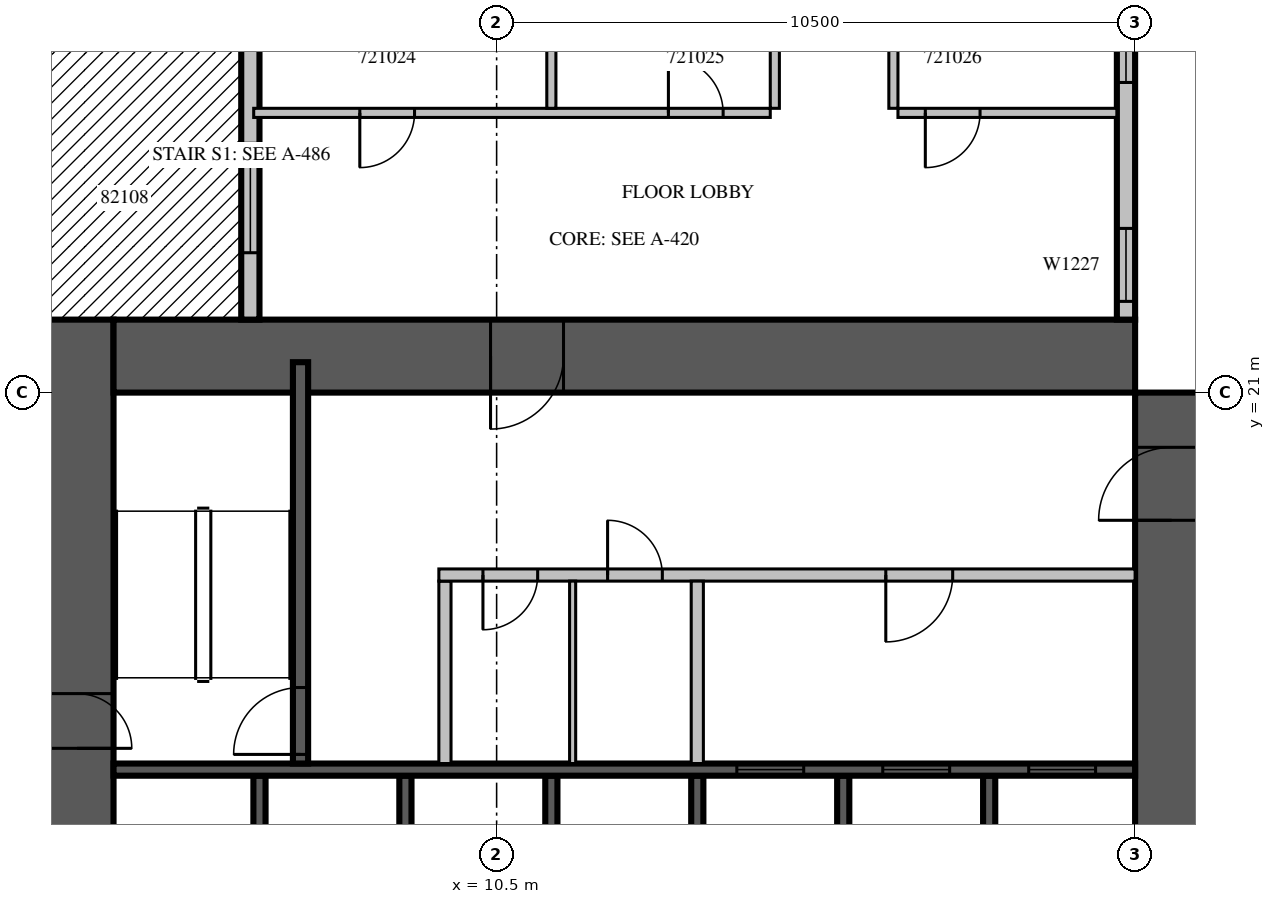
"""IFC4 building model, lengths in metres.
Left out: names, types, materials, properties, quantities, classifications, styles, units other than length and angle.
Written with IfcOpenShell. Run it as: python <this file> out.ifc"""

import sys

from ifc_helpers import new_model, si_unit, direction, frame, frame_2d, origin, place, context, subcontext, project, spatial, rectangle, extrude, source, transform, mapped, element, fill, save


model = new_model("IFC4")
c1 = context("Model", 3, precision=1e-05, world=origin(), true_north=direction((0.0, 1.0)))
c2 = subcontext(c1, "Body", "Model", "MODEL_VIEW")
j1 = project(units=[si_unit("LENGTHUNIT", "METRE"), si_unit("PLANEANGLEUNIT", "RADIAN")], contexts=[c1])
p1 = place(None, origin())
s1 = spatial("IfcSite", under=j1, at=p1, CompositionType="ELEMENT")
p2 = place(p1, origin())
s2 = spatial("IfcBuilding", under=s1, at=p2, CompositionType="ELEMENT")
p3 = place(p2, frame((0.0, 0.0, 99.3)))
s3 = spatial("IfcBuildingStorey", under=s2, at=p3, CompositionType="ELEMENT", Elevation=99.3)
m1 = source(origin(), c2, "Body", "SweptSolid", [
    extrude(rectangle(XDim=18.0, YDim=1.2, at=frame_2d((9.0, 0.0))), origin(), (0.0, 0.0, 1.0), 4.2),
])
p4 = place(p3, frame((3.6, 4.2, 0.0), z_axis=(0.0, 0.0, 1.0), x_axis=(0.0, 1.0, 0.0)))
e1 = element("IfcWall", 1, at=p4, inside=s3, PredefinedType="SHEAR", context=c2, shape_type="MappedRepresentation", body=[
    mapped(m1, transform((0.0, 0.0, 0.0), scale=1.0)),
])
m2 = source(origin(), c2, "Body", "SweptSolid", [
    extrude(rectangle(XDim=2.2, YDim=2.1, at=frame_2d((1.1, 1.05))), frame((0.0, 0.61, 0.0), z_axis=(0.0, -1.0, 0.0), x_axis=(1.0, 0.0, 0.0)), (0.0, 0.0, 1.0), 1.22),
])
p5 = place(p4, frame((4.2, 0.0, 0.0)))
e2 = element("IfcOpeningElement", 2, at=p5, cuts=e1, PredefinedType="OPENING", context=c2, shape_type="MappedRepresentation", body=[
    mapped(m2, transform((0.0, 0.0, 0.0), scale=1.0)),
])
p6 = place(p4, frame((10.95, 0.0, 0.0)))
e3 = element("IfcOpeningElement", 3, at=p6, cuts=e1, PredefinedType="OPENING", context=c2, shape_type="SweptSolid", body=[
    extrude(rectangle(XDim=0.9, YDim=2.1, at=frame_2d((0.45, 1.05))), frame((0.0, 0.61, 0.0), z_axis=(0.0, -1.0, 0.0), x_axis=(1.0, 0.0, 0.0)), (0.0, 0.0, 1.0), 1.22),
])
m3 = source(origin(), c2, "Body", "SweptSolid", [
    extrude(rectangle(XDim=16.8, YDim=1.2, at=frame_2d((8.4, 0.0))), origin(), (0.0, 0.0, 1.0), 4.2),
])
p7 = place(p3, frame((21.6, 4.2, 0.0), z_axis=(0.0, 0.0, 1.0), x_axis=(0.0, 1.0, 0.0)))
e4 = element("IfcWall", 4, at=p7, inside=s3, PredefinedType="SHEAR", context=c2, shape_type="MappedRepresentation", body=[
    mapped(m3, transform((0.0, 0.0, 0.0), scale=1.0)),
])
m4 = source(origin(), c2, "Body", "SweptSolid", [
    extrude(rectangle(XDim=1.2, YDim=2.1, at=frame_2d((0.6, 1.05))), frame((0.0, 0.61, 0.0), z_axis=(0.0, -1.0, 0.0), x_axis=(1.0, 0.0, 0.0)), (0.0, 0.0, 1.0), 1.22),
])
p8 = place(p7, frame((14.7, 0.0, 0.0)))
e5 = element("IfcOpeningElement", 5, at=p8, cuts=e4, PredefinedType="OPENING", context=c2, shape_type="MappedRepresentation", body=[
    mapped(m4, transform((0.0, 0.0, 0.0), scale=1.0)),
])
p9 = place(p3, frame((4.2, 21.6, 0.0), z_axis=(0.0, 0.0, 1.0), x_axis=(1.0, 0.0, 0.0)))
e6 = element("IfcWall", 6, at=p9, inside=s3, PredefinedType="SHEAR", context=c2, shape_type="MappedRepresentation", body=[
    mapped(m3, transform((0.0, 0.0, 0.0), scale=1.0)),
])
p10 = place(p9, frame((6.2, 0.0, 0.0)))
e7 = element("IfcOpeningElement", 7, at=p10, cuts=e6, PredefinedType="OPENING", context=c2, shape_type="MappedRepresentation", body=[
    mapped(m4, transform((0.0, 0.0, 0.0), scale=1.0)),
])
m5 = source(origin(), c2, "Body", "SweptSolid", [
    extrude(rectangle(XDim=6.6, YDim=0.3, at=frame_2d((3.3, 0.0))), origin(), (0.0, 0.0, 1.0), 3.8),
])
p11 = place(p3, frame((20.85, 22.2, 0.0), z_axis=(0.0, 0.0, 1.0), x_axis=(0.0, 1.0, 0.0)))
e8 = element("IfcWall", 8, at=p11, inside=s3, PredefinedType="STANDARD", context=c2, shape_type="MappedRepresentation", body=[
    mapped(m5, transform((0.0, 0.0, 0.0), scale=1.0)),
])
m6 = source(origin(), c2, "Body", "SweptSolid", [
    extrude(rectangle(XDim=1.2, YDim=2.7, at=frame_2d((0.6, 1.35))), frame((0.0, 0.16, 0.0), z_axis=(0.0, -1.0, 0.0), x_axis=(1.0, 0.0, 0.0)), (0.0, 0.0, 1.0), 0.32),
])
p12 = place(p11, frame((0.3, 0.0, 0.6)))
e9 = element("IfcOpeningElement", 9, at=p12, cuts=e8, PredefinedType="OPENING", context=c2, shape_type="MappedRepresentation", body=[
    mapped(m6, transform((0.0, 0.0, 0.0), scale=1.0)),
])
m7 = source(origin(), c2, "Body", "SweptSolid", [
    extrude(rectangle(XDim=2.4, YDim=2.7, at=frame_2d((1.2, 1.35))), frame((0.0, 0.16, 0.0), z_axis=(0.0, -1.0, 0.0), x_axis=(1.0, 0.0, 0.0)), (0.0, 0.0, 1.0), 0.32),
])
p13 = place(p11, frame((3.9, 0.0, 0.6)))
e10 = element("IfcOpeningElement", 10, at=p13, cuts=e8, PredefinedType="OPENING", context=c2, shape_type="MappedRepresentation", body=[
    mapped(m7, transform((0.0, 0.0, 0.0), scale=1.0)),
])
p14 = place(p3, frame((6.45, 38.4, 0.0), z_axis=(0.0, 0.0, 1.0), x_axis=(0.0, -1.0, 0.0)))
e11 = element("IfcWall", 11, at=p14, inside=s3, PredefinedType="STANDARD", context=c2, shape_type="SweptSolid", body=[
    extrude(rectangle(XDim=16.2, YDim=0.3, at=frame_2d((8.1, 0.0))), origin(), (0.0, 0.0, 1.0), 3.8),
])
m8 = source(origin(), c2, "Body", "SweptSolid", [
    extrude(rectangle(XDim=1.8, YDim=2.4, at=frame_2d((0.9, 1.2))), frame((0.0, 0.16, 0.0), z_axis=(0.0, -1.0, 0.0), x_axis=(1.0, 0.0, 0.0)), (0.0, 0.0, 1.0), 0.32),
])
p15 = place(p14, frame((1.15, 0.0, 0.0)))
e12 = element("IfcOpeningElement", 12, at=p15, cuts=e11, PredefinedType="OPENING", context=c2, shape_type="MappedRepresentation", body=[
    mapped(m8, transform((0.0, 0.0, 0.0), scale=1.0)),
])
p16 = place(p14, frame((5.05, 0.0, 0.0)))
e13 = element("IfcOpeningElement", 13, at=p16, cuts=e11, PredefinedType="OPENING", context=c2, shape_type="MappedRepresentation", body=[
    mapped(m8, transform((0.0, 0.0, 0.0), scale=1.0)),
])
m9 = source(origin(), c2, "Body", "SweptSolid", [
    extrude(rectangle(XDim=1.8, YDim=2.7, at=frame_2d((0.9, 1.35))), frame((0.0, 0.16, 0.0), z_axis=(0.0, -1.0, 0.0), x_axis=(1.0, 0.0, 0.0)), (0.0, 0.0, 1.0), 0.32),
])
p17 = place(p14, frame((9.438, 0.0, 0.6)))
e14 = element("IfcOpeningElement", 14, at=p17, cuts=e11, PredefinedType="OPENING", context=c2, shape_type="MappedRepresentation", body=[
    mapped(m9, transform((0.0, 0.0, 0.0), scale=1.0)),
])
p18 = place(p14, frame((13.3, 0.0, 0.0)))
e15 = element("IfcOpeningElement", 15, at=p18, cuts=e11, PredefinedType="OPENING", context=c2, shape_type="MappedRepresentation", body=[
    mapped(m8, transform((0.0, 0.0, 0.0), scale=1.0)),
])
m10 = source(origin(), c2, "Body", "SweptSolid", [
    extrude(rectangle(XDim=3.0, YDim=0.2, at=frame_2d((1.5, 0.0))), origin(), (0.0, 0.0, 1.0), 4.2),
])
for number, where, z_axis, x_axis in (
    (16, (6.6, 11.7, 0.0), (0.0, 0.0, 1.0), (0.0, 1.0, 0.0)),
    (17, (9.0, 11.7, 0.0), (0.0, 0.0, 1.0), (0.0, 1.0, 0.0)),
    (18, (11.4, 11.7, 0.0), (0.0, 0.0, 1.0), (0.0, 1.0, 0.0)),
    (19, (13.8, 11.7, 0.0), (0.0, 0.0, 1.0), (0.0, 1.0, 0.0)),
    (20, (16.2, 11.7, 0.0), (0.0, 0.0, 1.0), (0.0, 1.0, 0.0)),
    (21, (18.6, 11.7, 0.0), (0.0, 0.0, 1.0), (0.0, 1.0, 0.0)),
):
    element("IfcWall", number, at=place(p3, frame(where, z_axis=z_axis, x_axis=x_axis)), inside=s3, PredefinedType="SOLIDWALL", context=c2, shape_type="MappedRepresentation", body=[
        mapped(m10, transform((0.0, 0.0, 0.0), scale=1.0)),
    ])
m11 = source(origin(), c2, "Body", "SweptSolid", [
    extrude(rectangle(XDim=16.8, YDim=0.2, at=frame_2d((8.4, 0.0))), origin(), (0.0, 0.0, 1.0), 4.2),
])
p19 = place(p3, frame((4.2, 14.8, 0.0), z_axis=(0.0, 0.0, 1.0), x_axis=(1.0, 0.0, 0.0)))
e22 = element("IfcWall", 22, at=p19, inside=s3, PredefinedType="SOLIDWALL", context=c2, shape_type="MappedRepresentation", body=[
    mapped(m11, transform((0.0, 0.0, 0.0), scale=1.0)),
])
m12 = source(origin(), c2, "Body", "SweptSolid", [
    extrude(rectangle(XDim=1.1, YDim=2.1, at=frame_2d((0.55, 1.05))), frame((0.0, 0.11, 0.0), z_axis=(0.0, -1.0, 0.0), x_axis=(1.0, 0.0, 0.0)), (0.0, 0.0, 1.0), 0.22),
])
p20 = place(p19, frame((10.25, 0.0, 0.0)))
e23 = element("IfcOpeningElement", 23, at=p20, cuts=e22, PredefinedType="OPENING", context=c2, shape_type="MappedRepresentation", body=[
    mapped(m12, transform((0.0, 0.0, 0.0), scale=1.0)),
])
p21 = place(p19, frame((12.65, 0.0, 0.0)))
e24 = element("IfcOpeningElement", 24, at=p21, cuts=e22, PredefinedType="OPENING", context=c2, shape_type="MappedRepresentation", body=[
    mapped(m12, transform((0.0, 0.0, 0.0), scale=1.0)),
])
p22 = place(p19, frame((15.05, 0.0, 0.0)))
e25 = element("IfcOpeningElement", 25, at=p22, cuts=e22, PredefinedType="OPENING", context=c2, shape_type="MappedRepresentation", body=[
    mapped(m12, transform((0.0, 0.0, 0.0), scale=1.0)),
])
m13 = source(origin(), c2, "Body", "SweptSolid", [
    extrude(rectangle(XDim=6.6, YDim=0.25, at=frame_2d((3.3, 0.0))), origin(), (0.0, 0.0, 1.0), 3.8),
])
p23 = place(p3, frame((7.275, 14.9, 0.0), z_axis=(0.0, 0.0, 1.0), x_axis=(0.0, 1.0, 0.0)))
e26 = element("IfcWall", 26, at=p23, inside=s3, PredefinedType="SOLIDWALL", context=c2, shape_type="MappedRepresentation", body=[
    mapped(m13, transform((0.0, 0.0, 0.0), scale=1.0)),
])
m14 = source(origin(), c2, "Body", "SweptSolid", [
    extrude(rectangle(XDim=1.1, YDim=2.1, at=frame_2d((0.55, 1.05))), frame((0.0, 0.135, 0.0), z_axis=(0.0, -1.0, 0.0), x_axis=(1.0, 0.0, 0.0)), (0.0, 0.0, 1.0), 0.27),
])
p24 = place(p23, frame((0.15, 0.0, 0.0)))
e27 = element("IfcOpeningElement", 27, at=p24, cuts=e26, PredefinedType="OPENING", context=c2, shape_type="MappedRepresentation", body=[
    mapped(m14, transform((0.0, 0.0, 0.0), scale=1.0)),
])
m15 = source(origin(), c2, "Body", "SweptSolid", [
    extrude(rectangle(XDim=3.0, YDim=0.2, at=frame_2d((1.5, 0.0))), origin(), (0.0, 0.0, 1.0), 3.8),
])
p25 = place(p3, frame((9.65, 14.9, 0.0), z_axis=(0.0, 0.0, 1.0), x_axis=(0.0, 1.0, 0.0)))
e28 = element("IfcWall", 28, at=p25, inside=s3, PredefinedType="PARTITIONING", context=c2, shape_type="MappedRepresentation", body=[
    mapped(m15, transform((0.0, 0.0, 0.0), scale=1.0)),
])
m16 = source(origin(), c2, "Body", "SweptSolid", [
    extrude(rectangle(XDim=11.45, YDim=0.2, at=frame_2d((5.725, 0.0))), origin(), (0.0, 0.0, 1.0), 3.8),
])
p26 = place(p3, frame((9.55, 18.0, 0.0), z_axis=(0.0, 0.0, 1.0), x_axis=(1.0, 0.0, 0.0)))
e29 = element("IfcWall", 29, at=p26, inside=s3, PredefinedType="PARTITIONING", context=c2, shape_type="MappedRepresentation", body=[
    mapped(m16, transform((0.0, 0.0, 0.0), scale=1.0)),
])
m17 = source(origin(), c2, "Body", "SweptSolid", [
    extrude(rectangle(XDim=0.9, YDim=2.1, at=frame_2d((0.45, 1.05))), frame((0.0, 0.11, 0.0), z_axis=(0.0, -1.0, 0.0), x_axis=(1.0, 0.0, 0.0)), (0.0, 0.0, 1.0), 0.22),
])
p27 = place(p26, frame((0.725, 0.0, 0.0)))
e30 = element("IfcOpeningElement", 30, at=p27, cuts=e29, PredefinedType="OPENING", context=c2, shape_type="MappedRepresentation", body=[
    mapped(m17, transform((0.0, 0.0, 0.0), scale=1.0)),
])
p28 = place(p26, frame((2.775, 0.0, 0.0)))
e31 = element("IfcOpeningElement", 31, at=p28, cuts=e29, PredefinedType="OPENING", context=c2, shape_type="MappedRepresentation", body=[
    mapped(m17, transform((0.0, 0.0, 0.0), scale=1.0)),
])
p29 = place(p26, frame((7.35, 0.0, 0.0)))
e32 = element("IfcOpeningElement", 32, at=p29, cuts=e29, PredefinedType="OPENING", context=c2, shape_type="MappedRepresentation", body=[
    mapped(m12, transform((0.0, 0.0, 0.0), scale=1.0)),
])
p30 = place(p3, frame((13.8, 14.9, 0.0), z_axis=(0.0, 0.0, 1.0), x_axis=(0.0, 1.0, 0.0)))
e33 = element("IfcWall", 33, at=p30, inside=s3, PredefinedType="PARTITIONING", context=c2, shape_type="MappedRepresentation", body=[
    mapped(m15, transform((0.0, 0.0, 0.0), scale=1.0)),
])
m18 = source(origin(), c2, "Body", "SweptSolid", [
    extrude(rectangle(XDim=3.0, YDim=0.1, at=frame_2d((1.5, 0.0))), origin(), (0.0, 0.0, 1.0), 3.8),
])
p31 = place(p3, frame((11.75, 14.9, 0.0), z_axis=(0.0, 0.0, 1.0), x_axis=(0.0, 1.0, 0.0)))
e34 = element("IfcWall", 34, at=p31, inside=s3, PredefinedType="PARTITIONING", context=c2, shape_type="MappedRepresentation", body=[
    mapped(m18, transform((0.0, 0.0, 0.0), scale=1.0)),
])
p32 = place(p3, frame((6.505, 25.6, 0.0), z_axis=(0.0, 0.0, 1.0), x_axis=(1.0, 0.0, 0.0)))
e35 = element("IfcWall", 35, at=p32, inside=s3, PredefinedType="PARTITIONING", context=c2, shape_type="SweptSolid", body=[
    extrude(rectangle(XDim=8.495, YDim=0.15, at=frame_2d((4.247, 0.0))), origin(), (0.0, 0.0, 1.0), 3.8),
])
m19 = source(origin(), c2, "Body", "SweptSolid", [
    extrude(rectangle(XDim=0.9, YDim=2.1, at=frame_2d((0.45, 1.05))), frame((0.0, 0.085, 0.0), z_axis=(0.0, -1.0, 0.0), x_axis=(1.0, 0.0, 0.0)), (0.0, 0.0, 1.0), 0.17),
])
p33 = place(p32, frame((1.745, 0.0, 0.0)))
e36 = element("IfcOpeningElement", 36, at=p33, cuts=e35, PredefinedType="OPENING", context=c2, shape_type="MappedRepresentation", body=[
    mapped(m19, transform((0.0, 0.0, 0.0), scale=1.0)),
])
p34 = place(p32, frame((6.82, 0.0, 0.0)))
e37 = element("IfcOpeningElement", 37, at=p34, cuts=e35, PredefinedType="OPENING", context=c2, shape_type="MappedRepresentation", body=[
    mapped(m19, transform((0.0, 0.0, 0.0), scale=1.0)),
])
m20 = source(origin(), c2, "Body", "SweptSolid", [
    extrude(rectangle(XDim=3.6, YDim=0.15, at=frame_2d((1.8, 0.0))), origin(), (0.0, 0.0, 1.0), 3.8),
])
p35 = place(p3, frame((17.1, 25.6, 0.0), z_axis=(0.0, 0.0, 1.0), x_axis=(1.0, 0.0, 0.0)))
e38 = element("IfcWall", 38, at=p35, inside=s3, PredefinedType="PARTITIONING", context=c2, shape_type="MappedRepresentation", body=[
    mapped(m20, transform((0.0, 0.0, 0.0), scale=1.0)),
])
p36 = place(p35, frame((0.45, 0.0, 0.0)))
e39 = element("IfcOpeningElement", 39, at=p36, cuts=e38, PredefinedType="OPENING", context=c2, shape_type="MappedRepresentation", body=[
    mapped(m19, transform((0.0, 0.0, 0.0), scale=1.0)),
])
m21 = source(origin(), c2, "Body", "SweptSolid", [
    extrude(rectangle(XDim=3.65, YDim=0.15, at=frame_2d((1.825, 0.0))), origin(), (0.0, 0.0, 1.0), 3.8),
])
for number, where, z_axis, x_axis in (
    (40, (11.4, 25.675, 0.0), (0.0, 0.0, 1.0), (0.0, 1.0, 0.0)),
    (41, (15.075, 25.675, 0.0), (0.0, 0.0, 1.0), (0.0, 1.0, 0.0)),
    (42, (17.025, 29.325, 0.0), (0.0, 0.0, 1.0), (0.0, -1.0, 0.0)),
):
    element("IfcWall", number, at=place(p3, frame(where, z_axis=z_axis, x_axis=x_axis)), inside=s3, PredefinedType="PARTITIONING", context=c2, shape_type="MappedRepresentation", body=[
        mapped(m21, transform((0.0, 0.0, 0.0), scale=1.0)),
    ])
m22 = source(origin(), c2, "Body", "SweptSolid", [
    extrude(rectangle(XDim=1.2, YDim=2.7, at=frame_2d((0.6, 1.35))), frame((0.0, 0.03, 0.0), z_axis=(0.0, -1.0, 0.0), x_axis=(1.0, 0.0, 0.0)), (0.0, 0.0, 1.0), 0.06),
])
p37 = place(p12, origin())
e43 = element("IfcWindow", 43, at=p37, inside=s3, PartitioningType="SINGLE_PANEL", PredefinedType="WINDOW", context=c2, shape_type="MappedRepresentation", body=[
    mapped(m22, transform((0.0, 0.0, 0.0), scale=1.0)),
])
fill(e9, e43)
m23 = source(origin(), c2, "Body", "SweptSolid", [
    extrude(rectangle(XDim=2.4, YDim=2.7, at=frame_2d((1.2, 1.35))), frame((0.0, 0.03, 0.0), z_axis=(0.0, -1.0, 0.0), x_axis=(1.0, 0.0, 0.0)), (0.0, 0.0, 1.0), 0.06),
])
p38 = place(p13, origin())
e44 = element("IfcWindow", 44, at=p38, inside=s3, PartitioningType="SINGLE_PANEL", PredefinedType="WINDOW", context=c2, shape_type="MappedRepresentation", body=[
    mapped(m23, transform((0.0, 0.0, 0.0), scale=1.0)),
])
fill(e10, e44)
m24 = source(origin(), c2, "Body", "SweptSolid", [
    extrude(rectangle(XDim=1.8, YDim=2.4, at=frame_2d((0.9, 1.2))), frame((0.0, 0.025, 0.0), z_axis=(0.0, -1.0, 0.0), x_axis=(1.0, 0.0, 0.0)), (0.0, 0.0, 1.0), 0.05),
])
p39 = place(p18, origin())
e45 = element("IfcDoor", 45, at=p39, inside=s3, OperationType="SLIDING_TO_LEFT", PredefinedType="DOOR", context=c2, shape_type="MappedRepresentation", body=[
    mapped(m24, transform((0.0, 0.0, 0.0), scale=1.0)),
])
fill(e15, e45)
m25 = source(origin(), c2, "Body", "SweptSolid", [
    extrude(rectangle(XDim=1.1, YDim=2.1, at=frame_2d((0.55, 1.05))), frame((0.0, 0.025, 0.0), z_axis=(0.0, -1.0, 0.0), x_axis=(1.0, 0.0, 0.0)), (0.0, 0.0, 1.0), 0.05),
])
p40 = place(p20, origin())
e46 = element("IfcDoor", 46, at=p40, inside=s3, OperationType="SLIDING_TO_LEFT", PredefinedType="DOOR", context=c2, shape_type="MappedRepresentation", body=[
    mapped(m25, transform((0.0, 0.0, 0.0), scale=1.0)),
])
fill(e23, e46)
p41 = place(p21, origin())
e47 = element("IfcDoor", 47, at=p41, inside=s3, OperationType="SLIDING_TO_LEFT", PredefinedType="DOOR", context=c2, shape_type="MappedRepresentation", body=[
    mapped(m25, transform((0.0, 0.0, 0.0), scale=1.0)),
])
fill(e24, e47)
p42 = place(p22, origin())
e48 = element("IfcDoor", 48, at=p42, inside=s3, OperationType="SLIDING_TO_LEFT", PredefinedType="DOOR", context=c2, shape_type="MappedRepresentation", body=[
    mapped(m25, transform((0.0, 0.0, 0.0), scale=1.0)),
])
fill(e25, e48)
p43 = place(p24, origin())
e49 = element("IfcDoor", 49, at=p43, inside=s3, OperationType="SINGLE_SWING_LEFT", PredefinedType="DOOR", context=c2, shape_type="MappedRepresentation", body=[
    mapped(m25, transform((0.0, 0.0, 0.0), scale=1.0)),
])
fill(e27, e49)
m26 = source(origin(), c2, "Body", "SweptSolid", [
    extrude(rectangle(XDim=0.9, YDim=2.1, at=frame_2d((0.45, 1.05))), frame((0.0, 0.025, 0.0), z_axis=(0.0, -1.0, 0.0), x_axis=(1.0, 0.0, 0.0)), (0.0, 0.0, 1.0), 0.05),
])
p44 = place(p27, origin())
e50 = element("IfcDoor", 50, at=p44, inside=s3, OperationType="SINGLE_SWING_RIGHT", PredefinedType="DOOR", context=c2, shape_type="MappedRepresentation", body=[
    mapped(m26, transform((0.0, 0.0, 0.0), scale=1.0)),
])
fill(e30, e50)
p45 = place(p28, origin())
e51 = element("IfcDoor", 51, at=p45, inside=s3, OperationType="SINGLE_SWING_LEFT", PredefinedType="DOOR", context=c2, shape_type="MappedRepresentation", body=[
    mapped(m26, transform((0.0, 0.0, 0.0), scale=1.0)),
])
fill(e31, e51)
p46 = place(p29, origin())
e52 = element("IfcDoor", 52, at=p46, inside=s3, OperationType="SINGLE_SWING_RIGHT", PredefinedType="DOOR", context=c2, shape_type="MappedRepresentation", body=[
    mapped(m25, transform((0.0, 0.0, 0.0), scale=1.0)),
])
fill(e32, e52)
m27 = source(origin(), c2, "Body", "SweptSolid", [
    extrude(rectangle(XDim=1.2, YDim=2.1, at=frame_2d((0.6, 1.05))), frame((0.0, 0.025, 0.0), z_axis=(0.0, -1.0, 0.0), x_axis=(1.0, 0.0, 0.0)), (0.0, 0.0, 1.0), 0.05),
])
p47 = place(p10, origin())
e53 = element("IfcDoor", 53, at=p47, inside=s3, OperationType="SINGLE_SWING_RIGHT", PredefinedType="DOOR", context=c2, shape_type="MappedRepresentation", body=[
    mapped(m27, transform((0.0, 0.0, 0.0), scale=1.0)),
])
fill(e7, e53)
p48 = place(p8, origin())
e54 = element("IfcDoor", 54, at=p48, inside=s3, OperationType="SINGLE_SWING_LEFT", PredefinedType="DOOR", context=c2, shape_type="MappedRepresentation", body=[
    mapped(m27, transform((0.0, 0.0, 0.0), scale=1.0)),
])
fill(e5, e54)
p49 = place(p6, origin())
e55 = element("IfcDoor", 55, at=p49, inside=s3, OperationType="SINGLE_SWING_RIGHT", PredefinedType="DOOR", context=c2, shape_type="MappedRepresentation", body=[
    mapped(m26, transform((0.0, 0.0, 0.0), scale=1.0)),
])
fill(e3, e55)
p50 = place(p33, origin())
e56 = element("IfcDoor", 56, at=p50, inside=s3, OperationType="SINGLE_SWING_RIGHT", PredefinedType="DOOR", context=c2, shape_type="MappedRepresentation", body=[
    mapped(m26, transform((0.0, 0.0, 0.0), scale=1.0)),
])
fill(e36, e56)
p51 = place(p34, origin())
e57 = element("IfcDoor", 57, at=p51, inside=s3, OperationType="SINGLE_SWING_LEFT", PredefinedType="DOOR", context=c2, shape_type="MappedRepresentation", body=[
    mapped(m26, transform((0.0, 0.0, 0.0), scale=1.0)),
])
fill(e37, e57)
p52 = place(p36, origin())
e58 = element("IfcDoor", 58, at=p52, inside=s3, OperationType="SINGLE_SWING_RIGHT", PredefinedType="DOOR", context=c2, shape_type="MappedRepresentation", body=[
    mapped(m26, transform((0.0, 0.0, 0.0), scale=1.0)),
])
fill(e39, e58)
save(model, sys.argv[1])
